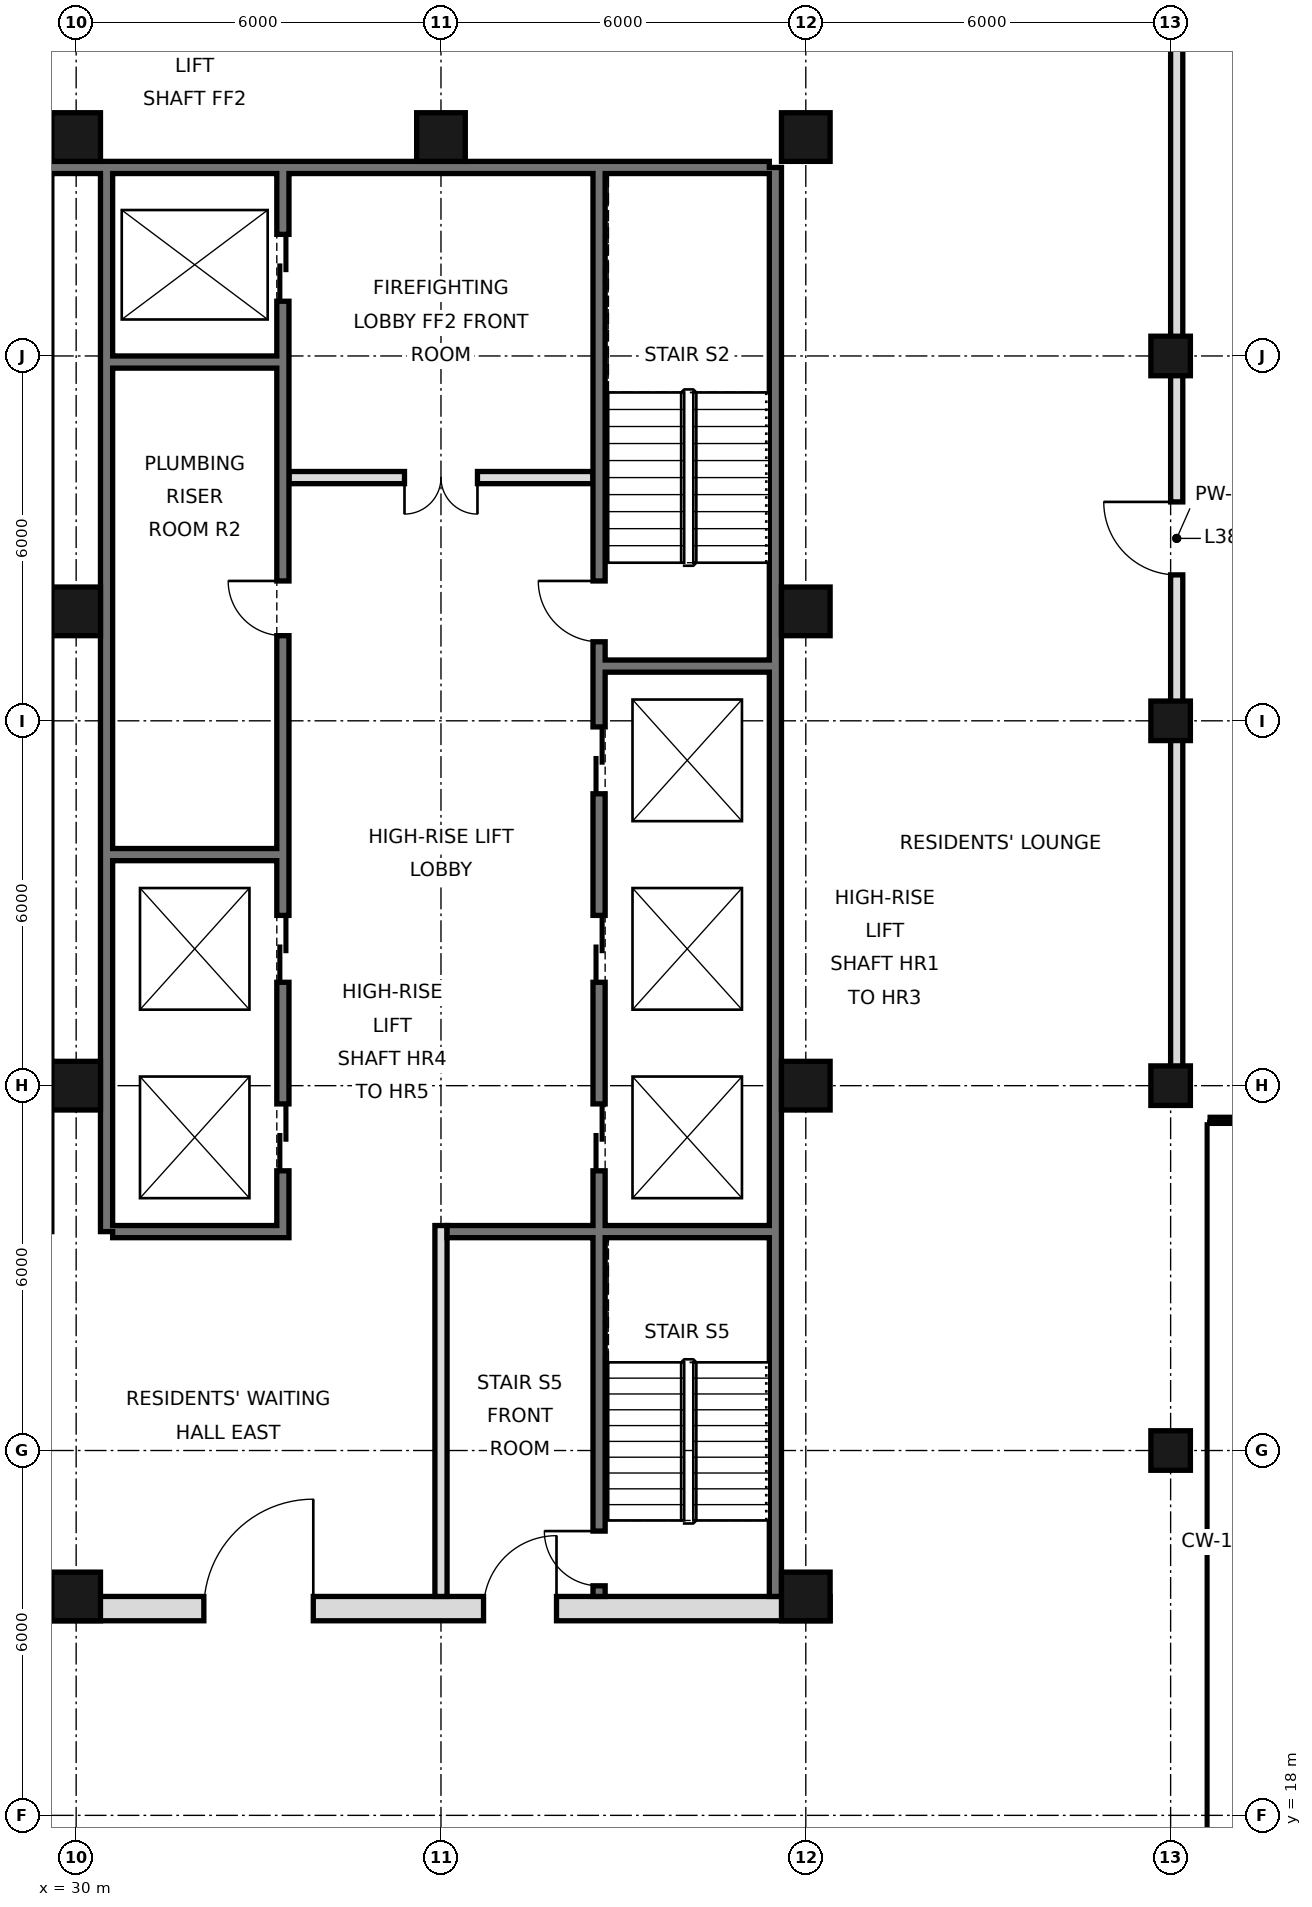
"""IFC4 building model, lengths in metres.
Left out: names, types, materials, properties, quantities, classifications, styles, units other than length and angle.
Written with IfcOpenShell. Run it as: python <this file> out.ifc"""

import sys

from ifc_helpers import new_model, si_unit, direction, frame, frame_2d, origin, origin_2d, place, context, subcontext, project, spatial, rectangle, hollow_rectangle, extrude, element, fill, save


model = new_model("IFC4")
c1 = context("Model", 3, precision=1e-05, world=origin(), true_north=direction((0.0, 1.0)))
c2 = subcontext(c1, "Body", "Model", "MODEL_VIEW")
j1 = project(units=[si_unit("LENGTHUNIT", "METRE"), si_unit("PLANEANGLEUNIT", "RADIAN")], contexts=[c1])
p1 = place(None, origin())
s1 = spatial("IfcSite", under=j1, at=p1, CompositionType="ELEMENT")
p2 = place(p1, origin())
s2 = spatial("IfcBuilding", under=s1, at=p2, CompositionType="ELEMENT")
p3 = place(p2, frame((0.0, 0.0, 167.2)))
s3 = spatial("IfcBuildingStorey", under=s2, at=p3, CompositionType="ELEMENT", Elevation=167.2)
for number, where, z_axis, x_axis in (
    (1, (30.0, 21.6, 0.0), (0.0, 0.0, 1.0), (1.0, 0.0, 0.0)),
    (2, (30.0, 30.0, 0.0), (0.0, 0.0, 1.0), (1.0, 0.0, 0.0)),
    (3, (30.0, 37.8, 0.0), (0.0, 0.0, 1.0), (1.0, 0.0, 0.0)),
    (4, (30.0, 45.6, 0.0), (0.0, 0.0, 1.0), (1.0, 0.0, 0.0)),
    (5, (36.0, 45.6, 0.0), (0.0, 0.0, 1.0), (1.0, 0.0, 0.0)),
    (6, (42.0, 21.6, 0.0), (0.0, 0.0, 1.0), (1.0, 0.0, 0.0)),
    (7, (42.0, 30.0, 0.0), (0.0, 0.0, 1.0), (1.0, 0.0, 0.0)),
    (8, (42.0, 37.8, 0.0), (0.0, 0.0, 1.0), (1.0, 0.0, 0.0)),
    (9, (42.0, 45.6, 0.0), (0.0, 0.0, 1.0), (1.0, 0.0, 0.0)),
):
    element("IfcColumn", number, at=place(p3, frame(where, z_axis=z_axis, x_axis=x_axis)), inside=s3, PredefinedType="COLUMN", context=c2, shape_type="SweptSolid", body=[
        extrude(hollow_rectangle(XDim=0.8, YDim=0.8, WallThickness=0.045, at=origin_2d()), origin(), (0.0, 0.0, 1.0), 3.6),
    ])
for number, where, z_axis, x_axis in (
    (10, (48.0, 24.0, 0.0), (0.0, 0.0, 1.0), (1.0, 0.0, 0.0)),
    (11, (48.0, 30.0, 0.0), (0.0, 0.0, 1.0), (1.0, 0.0, 0.0)),
    (12, (48.0, 36.0, 0.0), (0.0, 0.0, 1.0), (1.0, 0.0, 0.0)),
    (13, (48.0, 42.0, 0.0), (0.0, 0.0, 1.0), (1.0, 0.0, 0.0)),
):
    element("IfcColumn", number, at=place(p3, frame(where, z_axis=z_axis, x_axis=x_axis)), inside=s3, PredefinedType="COLUMN", context=c2, shape_type="SweptSolid", body=[
        extrude(hollow_rectangle(XDim=0.65, YDim=0.65, WallThickness=0.032, at=origin_2d()), origin(), (0.0, 0.0, 1.0), 3.6),
    ])
p4 = place(p3, frame((48.65, 29.43, 0.0), z_axis=(0.0, 0.0, 1.0), x_axis=(1.0, 0.0, 0.0)))
e14 = element("IfcWall", 14, at=p4, inside=s3, PredefinedType="SOLIDWALL", context=c2, shape_type="SweptSolid", body=[
    extrude(rectangle(XDim=11.9, YDim=0.1, at=frame_2d((5.95, 0.0))), origin(), (0.0, 0.0, 1.0), 3.42),
])
p5 = place(p4, frame((4.2, 0.0, 0.0)))
e15 = element("IfcOpeningElement", 15, at=p5, cuts=e14, PredefinedType="OPENING", context=c2, shape_type="SweptSolid", body=[
    extrude(rectangle(XDim=2.4, YDim=2.4, at=frame_2d((1.2, 1.2))), frame((0.0, 0.06, 0.0), z_axis=(0.0, -1.0, 0.0), x_axis=(1.0, 0.0, 0.0)), (0.0, 0.0, 1.0), 0.12),
])
p6 = place(p3, frame((48.1, 30.0, 0.0), z_axis=(0.0, 0.0, 1.0), x_axis=(0.0, 1.0, 0.0)))
e16 = element("IfcWall", 16, at=p6, inside=s3, PredefinedType="SOLIDWALL", context=c2, shape_type="SweptSolid", body=[
    extrude(rectangle(XDim=18.0, YDim=0.2, at=frame_2d((9.0, 0.0))), origin(), (0.0, 0.0, 1.0), 2.97),
])
p7 = place(p6, frame((8.4, 0.0, 0.0)))
e17 = element("IfcOpeningElement", 17, at=p7, cuts=e16, PredefinedType="OPENING", context=c2, shape_type="SweptSolid", body=[
    extrude(rectangle(XDim=1.2, YDim=2.4, at=frame_2d((0.6, 1.2))), frame((0.0, 0.11, 0.0), z_axis=(0.0, -1.0, 0.0), x_axis=(1.0, 0.0, 0.0)), (0.0, 0.0, 1.0), 0.22),
])
p8 = place(p3, frame((41.5, 21.6, 0.0), z_axis=(0.0, 0.0, 1.0), x_axis=(0.0, 1.0, 0.0)))
e18 = element("IfcWall", 18, at=p8, inside=s3, PredefinedType="SOLIDWALL", context=c2, shape_type="SweptSolid", body=[
    extrude(rectangle(XDim=23.5, YDim=0.2, at=frame_2d((11.75, 0.0))), origin(), (0.0, 0.0, 1.0), 3.42),
])
p9 = place(p3, frame((6.6, 45.1, 0.0), z_axis=(0.0, 0.0, 1.0), x_axis=(1.0, 0.0, 0.0)))
e19 = element("IfcWall", 19, at=p9, inside=s3, PredefinedType="SOLIDWALL", context=c2, shape_type="SweptSolid", body=[
    extrude(rectangle(XDim=34.8, YDim=0.2, at=frame_2d((17.4, 0.0))), origin(), (0.0, 0.0, 1.0), 3.42),
])
p10 = place(p3, frame((30.5, 27.6, 0.0), z_axis=(0.0, 0.0, 1.0), x_axis=(0.0, 1.0, 0.0)))
e20 = element("IfcWall", 20, at=p10, inside=s3, PredefinedType="SOLIDWALL", context=c2, shape_type="SweptSolid", body=[
    extrude(rectangle(XDim=17.5, YDim=0.2, at=frame_2d((8.75, 0.0))), origin(), (0.0, 0.0, 1.0), 3.42),
])
p11 = place(p3, frame((5.6, 21.4, 0.0), z_axis=(0.0, 0.0, 1.0), x_axis=(1.0, 0.0, 0.0)))
e21 = element("IfcWall", 21, at=p11, inside=s3, PredefinedType="SOLIDWALL", context=c2, shape_type="SweptSolid", body=[
    extrude(rectangle(XDim=36.8, YDim=0.4, at=frame_2d((18.4, 0.0))), origin(), (0.0, 0.0, 1.0), 3.42),
])
p12 = place(p11, frame((8.5, 0.0, 0.0)))
e22 = element("IfcOpeningElement", 22, at=p12, cuts=e21, PredefinedType="OPENING", context=c2, shape_type="SweptSolid", body=[
    extrude(rectangle(XDim=1.8, YDim=2.1, at=frame_2d((0.9, 1.05))), frame((0.0, 0.21, 0.0), z_axis=(0.0, -1.0, 0.0), x_axis=(1.0, 0.0, 0.0)), (0.0, 0.0, 1.0), 0.42),
])
p13 = place(p11, frame((17.5, 0.0, 0.0)))
e23 = element("IfcOpeningElement", 23, at=p13, cuts=e21, PredefinedType="OPENING", context=c2, shape_type="SweptSolid", body=[
    extrude(rectangle(XDim=1.8, YDim=2.1, at=frame_2d((0.9, 1.05))), frame((0.0, 0.21, 0.0), z_axis=(0.0, -1.0, 0.0), x_axis=(1.0, 0.0, 0.0)), (0.0, 0.0, 1.0), 0.42),
])
p14 = place(p11, frame((26.5, 0.0, 0.0)))
e24 = element("IfcOpeningElement", 24, at=p14, cuts=e21, PredefinedType="OPENING", context=c2, shape_type="SweptSolid", body=[
    extrude(rectangle(XDim=1.8, YDim=2.1, at=frame_2d((0.9, 1.05))), frame((0.0, 0.21, 0.0), z_axis=(0.0, -1.0, 0.0), x_axis=(1.0, 0.0, 0.0)), (0.0, 0.0, 1.0), 0.42),
])
p15 = place(p11, frame((4.5, 0.0, 0.0)))
e25 = element("IfcOpeningElement", 25, at=p15, cuts=e21, PredefinedType="OPENING", context=c2, shape_type="SweptSolid", body=[
    extrude(rectangle(XDim=1.2, YDim=2.1, at=frame_2d((0.6, 1.05))), frame((0.0, 0.21, 0.0), z_axis=(0.0, -1.0, 0.0), x_axis=(1.0, 0.0, 0.0)), (0.0, 0.0, 1.0), 0.42),
])
p16 = place(p11, frame((31.1, 0.0, 0.0)))
e26 = element("IfcOpeningElement", 26, at=p16, cuts=e21, PredefinedType="OPENING", context=c2, shape_type="SweptSolid", body=[
    extrude(rectangle(XDim=1.2, YDim=2.1, at=frame_2d((0.6, 1.05))), frame((0.0, 0.21, 0.0), z_axis=(0.0, -1.0, 0.0), x_axis=(1.0, 0.0, 0.0)), (0.0, 0.0, 1.0), 0.42),
])
p17 = place(p3, frame((33.4, 27.5, 0.0), z_axis=(0.0, 0.0, 1.0), x_axis=(0.0, 1.0, 0.0)))
e27 = element("IfcWall", 27, at=p17, inside=s3, PredefinedType="SOLIDWALL", context=c2, shape_type="SweptSolid", body=[
    extrude(rectangle(XDim=17.5, YDim=0.2, at=frame_2d((8.75, 0.0))), origin(), (0.0, 0.0, 1.0), 3.42),
])
p18 = place(p17, frame((1.1, 0.0, 0.0)))
e28 = element("IfcOpeningElement", 28, at=p18, cuts=e27, PredefinedType="OPENING", context=c2, shape_type="SweptSolid", body=[
    extrude(rectangle(XDim=1.1, YDim=2.1, at=frame_2d((0.55, 1.05))), frame((0.0, 0.11, 0.0), z_axis=(0.0, -1.0, 0.0), x_axis=(1.0, 0.0, 0.0)), (0.0, 0.0, 1.0), 0.22),
])
p19 = place(p17, frame((4.2, 0.0, 0.0)))
e29 = element("IfcOpeningElement", 29, at=p19, cuts=e27, PredefinedType="OPENING", context=c2, shape_type="SweptSolid", body=[
    extrude(rectangle(XDim=1.1, YDim=2.1, at=frame_2d((0.55, 1.05))), frame((0.0, 0.11, 0.0), z_axis=(0.0, -1.0, 0.0), x_axis=(1.0, 0.0, 0.0)), (0.0, 0.0, 1.0), 0.22),
])
p20 = place(p17, frame((15.4, 0.0, 0.0)))
e30 = element("IfcOpeningElement", 30, at=p20, cuts=e27, PredefinedType="OPENING", context=c2, shape_type="SweptSolid", body=[
    extrude(rectangle(XDim=1.1, YDim=2.1, at=frame_2d((0.55, 1.05))), frame((0.0, 0.11, 0.0), z_axis=(0.0, -1.0, 0.0), x_axis=(1.0, 0.0, 0.0)), (0.0, 0.0, 1.0), 0.22),
])
p21 = place(p17, frame((9.9, 0.0, 0.0)))
e31 = element("IfcOpeningElement", 31, at=p21, cuts=e27, PredefinedType="OPENING", context=c2, shape_type="SweptSolid", body=[
    extrude(rectangle(XDim=0.9, YDim=2.1, at=frame_2d((0.45, 1.05))), frame((0.0, 0.11, 0.0), z_axis=(0.0, -1.0, 0.0), x_axis=(1.0, 0.0, 0.0)), (0.0, 0.0, 1.0), 0.22),
])
p22 = place(p3, frame((36.0, 21.6, 0.0), z_axis=(0.0, 0.0, 1.0), x_axis=(0.0, 1.0, 0.0)))
e32 = element("IfcWall", 32, at=p22, inside=s3, PredefinedType="PARTITIONING", context=c2, shape_type="SweptSolid", body=[
    extrude(rectangle(XDim=6.1, YDim=0.2, at=frame_2d((3.05, 0.0))), origin(), (0.0, 0.0, 1.0), 3.42),
])
p23 = place(p3, frame((38.6, 21.6, 0.0), z_axis=(0.0, 0.0, 1.0), x_axis=(0.0, 1.0, 0.0)))
e33 = element("IfcWall", 33, at=p23, inside=s3, PredefinedType="SOLIDWALL", context=c2, shape_type="SweptSolid", body=[
    extrude(rectangle(XDim=23.4, YDim=0.2, at=frame_2d((11.7, 0.0))), origin(), (0.0, 0.0, 1.0), 3.42),
])
p24 = place(p23, frame((7.0, 0.0, 0.0)))
e34 = element("IfcOpeningElement", 34, at=p24, cuts=e33, PredefinedType="OPENING", context=c2, shape_type="SweptSolid", body=[
    extrude(rectangle(XDim=1.1, YDim=2.1, at=frame_2d((0.55, 1.05))), frame((0.0, 0.11, 0.0), z_axis=(0.0, -1.0, 0.0), x_axis=(1.0, 0.0, 0.0)), (0.0, 0.0, 1.0), 0.22),
])
p25 = place(p23, frame((10.1, 0.0, 0.0)))
e35 = element("IfcOpeningElement", 35, at=p25, cuts=e33, PredefinedType="OPENING", context=c2, shape_type="SweptSolid", body=[
    extrude(rectangle(XDim=1.1, YDim=2.1, at=frame_2d((0.55, 1.05))), frame((0.0, 0.11, 0.0), z_axis=(0.0, -1.0, 0.0), x_axis=(1.0, 0.0, 0.0)), (0.0, 0.0, 1.0), 0.22),
])
p26 = place(p23, frame((13.2, 0.0, 0.0)))
e36 = element("IfcOpeningElement", 36, at=p26, cuts=e33, PredefinedType="OPENING", context=c2, shape_type="SweptSolid", body=[
    extrude(rectangle(XDim=1.1, YDim=2.1, at=frame_2d((0.55, 1.05))), frame((0.0, 0.11, 0.0), z_axis=(0.0, -1.0, 0.0), x_axis=(1.0, 0.0, 0.0)), (0.0, 0.0, 1.0), 0.22),
])
p27 = place(p23, frame((15.7, 0.0, 0.0)))
e37 = element("IfcOpeningElement", 37, at=p27, cuts=e33, PredefinedType="OPENING", context=c2, shape_type="SweptSolid", body=[
    extrude(rectangle(XDim=1.0, YDim=2.1, at=frame_2d((0.5, 1.05))), frame((0.0, 0.11, 0.0), z_axis=(0.0, -1.0, 0.0), x_axis=(1.0, 0.0, 0.0)), (0.0, 0.0, 1.0), 0.22),
])
p28 = place(p23, frame((0.175, 0.0, 0.0)))
e38 = element("IfcOpeningElement", 38, at=p28, cuts=e33, PredefinedType="OPENING", context=c2, shape_type="SweptSolid", body=[
    extrude(rectangle(XDim=0.9, YDim=2.1, at=frame_2d((0.45, 1.05))), frame((0.0, 0.11, 0.0), z_axis=(0.0, -1.0, 0.0), x_axis=(1.0, 0.0, 0.0)), (0.0, 0.0, 1.0), 0.22),
])
p29 = place(p3, frame((30.6, 27.6, 0.0), z_axis=(0.0, 0.0, 1.0), x_axis=(1.0, 0.0, 0.0)))
e39 = element("IfcWall", 39, at=p29, inside=s3, PredefinedType="SOLIDWALL", context=c2, shape_type="SweptSolid", body=[
    extrude(rectangle(XDim=2.7, YDim=0.2, at=frame_2d((1.35, 0.0))), origin(), (0.0, 0.0, 1.0), 3.42),
])
p30 = place(p3, frame((36.1, 27.6, 0.0), z_axis=(0.0, 0.0, 1.0), x_axis=(1.0, 0.0, 0.0)))
e40 = element("IfcWall", 40, at=p30, inside=s3, PredefinedType="SOLIDWALL", context=c2, shape_type="SweptSolid", body=[
    extrude(rectangle(XDim=5.3, YDim=0.2, at=frame_2d((2.65, 0.0))), origin(), (0.0, 0.0, 1.0), 3.42),
])
for number, where, z_axis, x_axis in (
    (41, (30.6, 33.8, 0.0), (0.0, 0.0, 1.0), (1.0, 0.0, 0.0)),
    (42, (38.7, 36.9, 0.0), (0.0, 0.0, 1.0), (1.0, 0.0, 0.0)),
):
    element("IfcWall", number, at=place(p3, frame(where, z_axis=z_axis, x_axis=x_axis)), inside=s3, PredefinedType="SOLIDWALL", context=c2, shape_type="SweptSolid", body=[
        extrude(rectangle(XDim=2.7, YDim=0.2, at=frame_2d((1.35, 0.0))), origin(), (0.0, 0.0, 1.0), 3.42),
    ])
p31 = place(p3, frame((33.5, 40.0, 0.0), z_axis=(0.0, 0.0, 1.0), x_axis=(1.0, 0.0, 0.0)))
e43 = element("IfcWall", 43, at=p31, inside=s3, PredefinedType="PARTITIONING", context=c2, shape_type="SweptSolid", body=[
    extrude(rectangle(XDim=5.0, YDim=0.2, at=frame_2d((2.5, 0.0))), origin(), (0.0, 0.0, 1.0), 3.42),
])
p32 = place(p31, frame((1.9, 0.0, 0.0)))
e44 = element("IfcOpeningElement", 44, at=p32, cuts=e43, PredefinedType="OPENING", context=c2, shape_type="SweptSolid", body=[
    extrude(rectangle(XDim=1.2, YDim=2.1, at=frame_2d((0.6, 1.05))), frame((0.0, 0.11, 0.0), z_axis=(0.0, -1.0, 0.0), x_axis=(1.0, 0.0, 0.0)), (0.0, 0.0, 1.0), 0.22),
])
p33 = place(p3, frame((30.6, 41.9, 0.0), z_axis=(0.0, 0.0, 1.0), x_axis=(1.0, 0.0, 0.0)))
e45 = element("IfcWall", 45, at=p33, inside=s3, PredefinedType="SOLIDWALL", context=c2, shape_type="SweptSolid", body=[
    extrude(rectangle(XDim=2.7, YDim=0.2, at=frame_2d((1.35, 0.0))), origin(), (0.0, 0.0, 1.0), 3.42),
])
p34 = place(p7, frame((1.2, 0.0, 0.0), z_axis=(0.0, 0.0, 1.0), x_axis=(-1.0, 0.0, 0.0)))
e46 = element("IfcDoor", 46, at=p34, inside=s3, OperationType="SINGLE_SWING_LEFT", PredefinedType="DOOR", context=c2, shape_type="SweptSolid", body=[
    extrude(rectangle(XDim=1.2, YDim=2.4, at=frame_2d((0.6, 1.2))), frame((0.0, 0.025, 0.0), z_axis=(0.0, -1.0, 0.0), x_axis=(1.0, 0.0, 0.0)), (0.0, 0.0, 1.0), 0.05),
])
fill(e17, e46)
p35 = place(p14, frame((1.8, 0.0, 0.0), z_axis=(0.0, 0.0, 1.0), x_axis=(-1.0, 0.0, 0.0)))
e47 = element("IfcDoor", 47, at=p35, inside=s3, OperationType="SINGLE_SWING_LEFT", PredefinedType="DOOR", context=c2, shape_type="SweptSolid", body=[
    extrude(rectangle(XDim=1.8, YDim=2.1, at=frame_2d((0.9, 1.05))), frame((0.0, 0.025, 0.0), z_axis=(0.0, -1.0, 0.0), x_axis=(1.0, 0.0, 0.0)), (0.0, 0.0, 1.0), 0.05),
])
fill(e24, e47)
p36 = place(p16, frame((1.2, 0.0, 0.0), z_axis=(0.0, 0.0, 1.0), x_axis=(-1.0, 0.0, 0.0)))
e48 = element("IfcDoor", 48, at=p36, inside=s3, OperationType="SINGLE_SWING_LEFT", PredefinedType="DOOR", context=c2, shape_type="SweptSolid", body=[
    extrude(rectangle(XDim=1.2, YDim=2.1, at=frame_2d((0.6, 1.05))), frame((0.0, 0.025, 0.0), z_axis=(0.0, -1.0, 0.0), x_axis=(1.0, 0.0, 0.0)), (0.0, 0.0, 1.0), 0.05),
])
fill(e26, e48)
p37 = place(p32, frame((1.2, 0.0, 0.0), z_axis=(0.0, 0.0, 1.0), x_axis=(-1.0, 0.0, 0.0)))
e49 = element("IfcDoor", 49, at=p37, inside=s3, OperationType="DOUBLE_DOOR_SINGLE_SWING", PredefinedType="DOOR", context=c2, shape_type="SweptSolid", body=[
    extrude(rectangle(XDim=1.2, YDim=2.1, at=frame_2d((0.6, 1.05))), frame((0.0, 0.025, 0.0), z_axis=(0.0, -1.0, 0.0), x_axis=(1.0, 0.0, 0.0)), (0.0, 0.0, 1.0), 0.05),
])
fill(e44, e49)
p38 = place(p24, origin())
e50 = element("IfcDoor", 50, at=p38, inside=s3, OperationType="DOUBLE_DOOR_SLIDING", PredefinedType="DOOR", context=c2, shape_type="SweptSolid", body=[
    extrude(rectangle(XDim=1.1, YDim=2.1, at=frame_2d((0.55, 1.05))), frame((0.0, 0.025, 0.0), z_axis=(0.0, -1.0, 0.0), x_axis=(1.0, 0.0, 0.0)), (0.0, 0.0, 1.0), 0.05),
])
fill(e34, e50)
p39 = place(p25, origin())
e51 = element("IfcDoor", 51, at=p39, inside=s3, OperationType="DOUBLE_DOOR_SLIDING", PredefinedType="DOOR", context=c2, shape_type="SweptSolid", body=[
    extrude(rectangle(XDim=1.1, YDim=2.1, at=frame_2d((0.55, 1.05))), frame((0.0, 0.025, 0.0), z_axis=(0.0, -1.0, 0.0), x_axis=(1.0, 0.0, 0.0)), (0.0, 0.0, 1.0), 0.05),
])
fill(e35, e51)
p40 = place(p26, origin())
e52 = element("IfcDoor", 52, at=p40, inside=s3, OperationType="DOUBLE_DOOR_SLIDING", PredefinedType="DOOR", context=c2, shape_type="SweptSolid", body=[
    extrude(rectangle(XDim=1.1, YDim=2.1, at=frame_2d((0.55, 1.05))), frame((0.0, 0.025, 0.0), z_axis=(0.0, -1.0, 0.0), x_axis=(1.0, 0.0, 0.0)), (0.0, 0.0, 1.0), 0.05),
])
fill(e36, e52)
p41 = place(p18, origin())
e53 = element("IfcDoor", 53, at=p41, inside=s3, OperationType="DOUBLE_DOOR_SLIDING", PredefinedType="DOOR", context=c2, shape_type="SweptSolid", body=[
    extrude(rectangle(XDim=1.1, YDim=2.1, at=frame_2d((0.55, 1.05))), frame((0.0, 0.025, 0.0), z_axis=(0.0, -1.0, 0.0), x_axis=(1.0, 0.0, 0.0)), (0.0, 0.0, 1.0), 0.05),
])
fill(e28, e53)
p42 = place(p19, origin())
e54 = element("IfcDoor", 54, at=p42, inside=s3, OperationType="DOUBLE_DOOR_SLIDING", PredefinedType="DOOR", context=c2, shape_type="SweptSolid", body=[
    extrude(rectangle(XDim=1.1, YDim=2.1, at=frame_2d((0.55, 1.05))), frame((0.0, 0.025, 0.0), z_axis=(0.0, -1.0, 0.0), x_axis=(1.0, 0.0, 0.0)), (0.0, 0.0, 1.0), 0.05),
])
fill(e29, e54)
p43 = place(p20, origin())
e55 = element("IfcDoor", 55, at=p43, inside=s3, OperationType="DOUBLE_DOOR_SLIDING", PredefinedType="DOOR", context=c2, shape_type="SweptSolid", body=[
    extrude(rectangle(XDim=1.1, YDim=2.1, at=frame_2d((0.55, 1.05))), frame((0.0, 0.025, 0.0), z_axis=(0.0, -1.0, 0.0), x_axis=(1.0, 0.0, 0.0)), (0.0, 0.0, 1.0), 0.05),
])
fill(e30, e55)
p44 = place(p27, frame((1.0, 0.0, 0.0), z_axis=(0.0, 0.0, 1.0), x_axis=(-1.0, 0.0, 0.0)))
e56 = element("IfcDoor", 56, at=p44, inside=s3, OperationType="SINGLE_SWING_LEFT", PredefinedType="DOOR", context=c2, shape_type="SweptSolid", body=[
    extrude(rectangle(XDim=1.0, YDim=2.1, at=frame_2d((0.5, 1.05))), frame((0.0, 0.025, 0.0), z_axis=(0.0, -1.0, 0.0), x_axis=(1.0, 0.0, 0.0)), (0.0, 0.0, 1.0), 0.05),
])
fill(e37, e56)
p45 = place(p28, frame((0.9, 0.0, 0.0), z_axis=(0.0, 0.0, 1.0), x_axis=(-1.0, 0.0, 0.0)))
e57 = element("IfcDoor", 57, at=p45, inside=s3, OperationType="SINGLE_SWING_LEFT", PredefinedType="DOOR", context=c2, shape_type="SweptSolid", body=[
    extrude(rectangle(XDim=0.9, YDim=2.1, at=frame_2d((0.45, 1.05))), frame((0.0, 0.025, 0.0), z_axis=(0.0, -1.0, 0.0), x_axis=(1.0, 0.0, 0.0)), (0.0, 0.0, 1.0), 0.05),
])
fill(e38, e57)
p46 = place(p21, frame((0.9, 0.0, 0.0), z_axis=(0.0, 0.0, 1.0), x_axis=(-1.0, 0.0, 0.0)))
e58 = element("IfcDoor", 58, at=p46, inside=s3, OperationType="SINGLE_SWING_LEFT", PredefinedType="DOOR", context=c2, shape_type="SweptSolid", body=[
    extrude(rectangle(XDim=0.9, YDim=2.1, at=frame_2d((0.45, 1.05))), frame((0.0, 0.025, 0.0), z_axis=(0.0, -1.0, 0.0), x_axis=(1.0, 0.0, 0.0)), (0.0, 0.0, 1.0), 0.05),
])
fill(e31, e58)
save(model, sys.argv[1])
